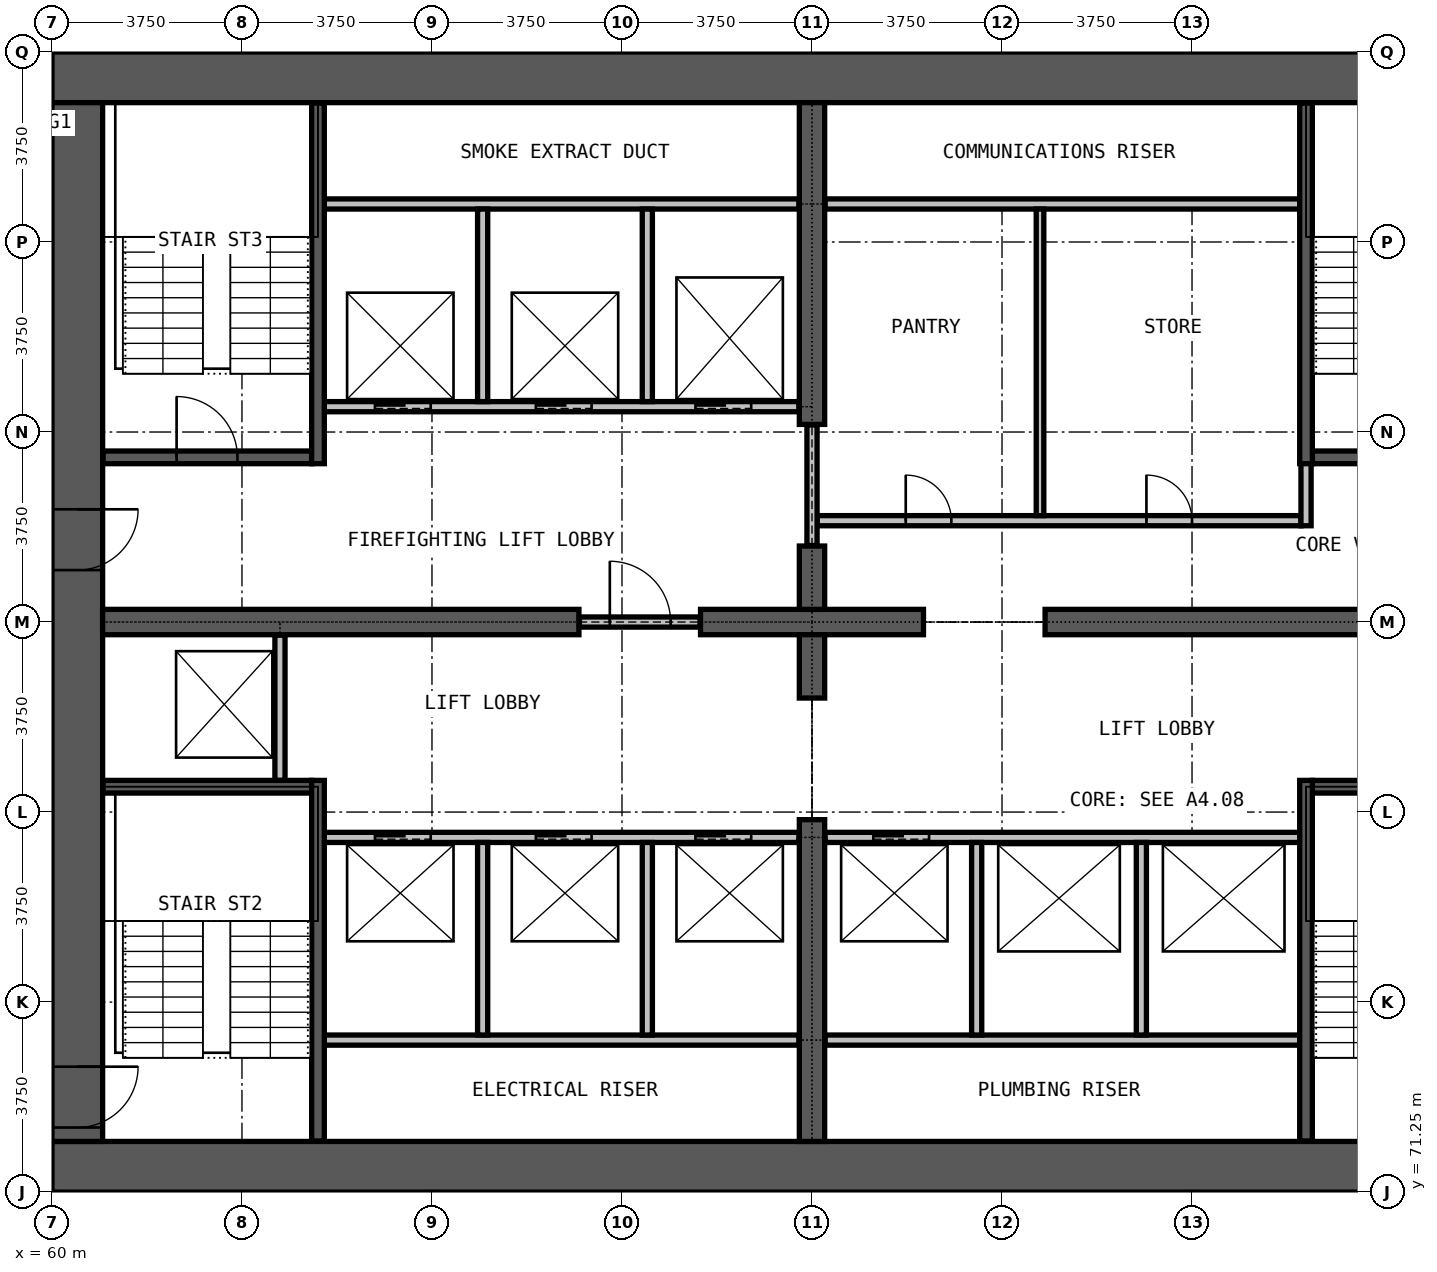
"""IFC4 building model, lengths in metres.
Left out: names, types, materials, properties, quantities, classifications, styles, units other than length and angle.
Written with IfcOpenShell. Run it as: python <this file> out.ifc"""

import sys

from ifc_helpers import new_model, si_unit, direction, frame, frame_2d, origin, place, context, subcontext, project, spatial, rectangle, extrude, element, fill, save


model = new_model("IFC4")
c1 = context("Model", 3, precision=1e-05, world=origin(), true_north=direction((0.0, 1.0)))
c2 = subcontext(c1, "Body", "Model", "MODEL_VIEW")
j1 = project(units=[si_unit("LENGTHUNIT", "METRE"), si_unit("PLANEANGLEUNIT", "RADIAN")], contexts=[c1])
p1 = place(None, origin())
s1 = spatial("IfcSite", under=j1, at=p1, CompositionType="ELEMENT")
p2 = place(p1, origin())
s2 = spatial("IfcBuilding", under=s1, at=p2, CompositionType="ELEMENT")
p3 = place(p2, frame((0.0, 0.0, 92.3)))
s3 = spatial("IfcBuildingStorey", under=s2, at=p3, CompositionType="ELEMENT", Elevation=92.3)
for number, where, z_axis, x_axis in (
    (1, (60.0, 71.75, 0.0), (0.0, 0.0, 1.0), (1.0, 0.0, 0.0)),
    (2, (90.0, 93.25, 0.0), (0.0, 0.0, 1.0), (-1.0, 0.0, 0.0)),
):
    element("IfcWall", number, at=place(p3, frame(where, z_axis=z_axis, x_axis=x_axis)), inside=s3, PredefinedType="SHEAR", context=c2, shape_type="SweptSolid", body=[
        extrude(rectangle(XDim=30.0, YDim=1.0, at=frame_2d((15.0, 0.0))), origin(), (0.0, 0.0, 1.0), 3.3),
    ])
p4 = place(p3, frame((60.5, 92.75, 0.0), z_axis=(0.0, 0.0, 1.0), x_axis=(0.0, -1.0, 0.0)))
e3 = element("IfcWall", 3, at=p4, inside=s3, PredefinedType="SHEAR", context=c2, shape_type="SweptSolid", body=[
    extrude(rectangle(XDim=20.5, YDim=1.0, at=frame_2d((10.25, 0.0))), origin(), (0.0, 0.0, 1.0), 3.3),
])
p5 = place(p4, frame((19.025, 0.0, 0.0)))
e4 = element("IfcOpeningElement", 4, at=p5, cuts=e3, PredefinedType="OPENING", context=c2, shape_type="SweptSolid", body=[
    extrude(rectangle(XDim=1.2, YDim=2.2, at=frame_2d((0.6, 1.1))), frame((0.0, 0.51, 0.0), z_axis=(0.0, -1.0, 0.0), x_axis=(1.0, 0.0, 0.0)), (0.0, 0.0, 1.0), 1.02),
])
p6 = place(p4, frame((8.025, 0.0, 0.0)))
e5 = element("IfcOpeningElement", 5, at=p6, cuts=e3, PredefinedType="OPENING", context=c2, shape_type="SweptSolid", body=[
    extrude(rectangle(XDim=1.2, YDim=2.2, at=frame_2d((0.6, 1.1))), frame((0.0, 0.51, 0.0), z_axis=(0.0, -1.0, 0.0), x_axis=(1.0, 0.0, 0.0)), (0.0, 0.0, 1.0), 1.02),
])
p7 = place(p3, frame((61.0, 82.5, 0.0), z_axis=(0.0, 0.0, 1.0), x_axis=(1.0, 0.0, 0.0)))
e6 = element("IfcWall", 6, at=p7, inside=s3, PredefinedType="SHEAR", context=c2, shape_type="SweptSolid", body=[
    extrude(rectangle(XDim=9.4, YDim=0.5, at=frame_2d((4.7, 0.0))), origin(), (0.0, 0.0, 1.0), 3.3),
])
p8 = place(p3, frame((72.8, 82.5, 0.0), z_axis=(0.0, 0.0, 1.0), x_axis=(1.0, 0.0, 0.0)))
e7 = element("IfcWall", 7, at=p8, inside=s3, PredefinedType="SHEAR", context=c2, shape_type="SweptSolid", body=[
    extrude(rectangle(XDim=4.4, YDim=0.5, at=frame_2d((2.2, 0.0))), origin(), (0.0, 0.0, 1.0), 3.3),
])
p9 = place(p3, frame((79.6, 82.5, 0.0), z_axis=(0.0, 0.0, 1.0), x_axis=(1.0, 0.0, 0.0)))
e8 = element("IfcWall", 8, at=p9, inside=s3, PredefinedType="SHEAR", context=c2, shape_type="SweptSolid", body=[
    extrude(rectangle(XDim=9.4, YDim=0.5, at=frame_2d((4.7, 0.0))), origin(), (0.0, 0.0, 1.0), 3.3),
])
p10 = place(p3, frame((75.0, 72.25, 0.0), z_axis=(0.0, 0.0, 1.0), x_axis=(0.0, 1.0, 0.0)))
e9 = element("IfcWall", 9, at=p10, inside=s3, PredefinedType="SHEAR", context=c2, shape_type="SweptSolid", body=[
    extrude(rectangle(XDim=6.35, YDim=0.5, at=frame_2d((3.175, 0.0))), origin(), (0.0, 0.0, 1.0), 3.3),
])
for number, where, z_axis, x_axis in (
    (10, (75.0, 81.0, 0.0), (0.0, 0.0, 1.0), (0.0, 1.0, 0.0)),
    (11, (75.0, 82.75, 0.0), (0.0, 0.0, 1.0), (0.0, 1.0, 0.0)),
):
    element("IfcWall", number, at=place(p3, frame(where, z_axis=z_axis, x_axis=x_axis)), inside=s3, PredefinedType="SHEAR", context=c2, shape_type="SweptSolid", body=[
        extrude(rectangle(XDim=1.25, YDim=0.5, at=frame_2d((0.625, 0.0))), origin(), (0.0, 0.0, 1.0), 3.3),
    ])
p11 = place(p3, frame((75.0, 86.4, 0.0), z_axis=(0.0, 0.0, 1.0), x_axis=(0.0, 1.0, 0.0)))
e12 = element("IfcWall", 12, at=p11, inside=s3, PredefinedType="SHEAR", context=c2, shape_type="SweptSolid", body=[
    extrude(rectangle(XDim=6.35, YDim=0.5, at=frame_2d((3.175, 0.0))), origin(), (0.0, 0.0, 1.0), 3.3),
])
p12 = place(p3, frame((70.41, 82.5, 0.0), z_axis=(0.0, 0.0, 1.0), x_axis=(1.0, 0.0, 0.0)))
e13 = element("IfcWall", 13, at=p12, inside=s3, PredefinedType="PARTITIONING", context=c2, shape_type="SweptSolid", body=[
    extrude(rectangle(XDim=2.38, YDim=0.2, at=frame_2d((1.19, 0.0))), origin(), (0.0, 0.0, 1.0), 2.4),
])
p13 = place(p12, frame((0.6, 0.0, 0.0)))
e14 = element("IfcOpeningElement", 14, at=p13, cuts=e13, PredefinedType="OPENING", context=c2, shape_type="SweptSolid", body=[
    extrude(rectangle(XDim=1.2, YDim=2.2, at=frame_2d((0.6, 1.1))), frame((0.0, 0.11, 0.0), z_axis=(0.0, -1.0, 0.0), x_axis=(1.0, 0.0, 0.0)), (0.0, 0.0, 1.0), 0.22),
])
p14 = place(p3, frame((75.1, 84.5, 0.0), z_axis=(0.0, 0.0, 1.0), x_axis=(1.0, 0.0, 0.0)))
e15 = element("IfcWall", 15, at=p14, inside=s3, PredefinedType="PARTITIONING", context=c2, shape_type="SweptSolid", body=[
    extrude(rectangle(XDim=9.55, YDim=0.2, at=frame_2d((4.775, 0.0))), origin(), (0.0, 0.0, 1.0), 3.0),
])
p15 = place(p14, frame((1.75, 0.0, 0.0)))
e16 = element("IfcOpeningElement", 16, at=p15, cuts=e15, PredefinedType="OPENING", context=c2, shape_type="SweptSolid", body=[
    extrude(rectangle(XDim=0.9, YDim=2.2, at=frame_2d((0.45, 1.1))), frame((0.0, 0.11, 0.0), z_axis=(0.0, -1.0, 0.0), x_axis=(1.0, 0.0, 0.0)), (0.0, 0.0, 1.0), 0.22),
])
p16 = place(p14, frame((6.5, 0.0, 0.0)))
e17 = element("IfcOpeningElement", 17, at=p16, cuts=e15, PredefinedType="OPENING", context=c2, shape_type="SweptSolid", body=[
    extrude(rectangle(XDim=0.9, YDim=2.2, at=frame_2d((0.45, 1.1))), frame((0.0, 0.11, 0.0), z_axis=(0.0, -1.0, 0.0), x_axis=(1.0, 0.0, 0.0)), (0.0, 0.0, 1.0), 0.22),
])
p17 = place(p3, frame((75.26, 90.75, 0.0), z_axis=(0.0, 0.0, 1.0), x_axis=(1.0, 0.0, 0.0)))
e18 = element("IfcWall", 18, at=p17, inside=s3, PredefinedType="PARTITIONING", context=c2, shape_type="SweptSolid", body=[
    extrude(rectangle(XDim=9.365, YDim=0.2, at=frame_2d((4.683, 0.0))), origin(), (0.0, 0.0, 1.0), 3.0),
])
p18 = place(p3, frame((75.0, 84.01, 0.0), z_axis=(0.0, 0.0, 1.0), x_axis=(0.0, 1.0, 0.0)))
e19 = element("IfcWall", 19, at=p18, inside=s3, PredefinedType="PARTITIONING", context=c2, shape_type="SweptSolid", body=[
    extrude(rectangle(XDim=2.38, YDim=0.2, at=frame_2d((1.19, 0.0))), origin(), (0.0, 0.0, 1.0), 2.4),
])
p19 = place(p3, frame((84.75, 84.4, 0.0), z_axis=(0.0, 0.0, 1.0), x_axis=(0.0, 1.0, 0.0)))
e20 = element("IfcWall", 20, at=p19, inside=s3, PredefinedType="PARTITIONING", context=c2, shape_type="SweptSolid", body=[
    extrude(rectangle(XDim=1.475, YDim=0.2, at=frame_2d((0.738, 0.0))), origin(), (0.0, 0.0, 1.0), 3.0),
])
p20 = place(p3, frame((79.5, 84.6, 0.0), z_axis=(0.0, 0.0, 1.0), x_axis=(0.0, 1.0, 0.0)))
e21 = element("IfcWall", 21, at=p20, inside=s3, PredefinedType="PARTITIONING", context=c2, shape_type="SweptSolid", body=[
    extrude(rectangle(XDim=6.05, YDim=0.15, at=frame_2d((3.025, 0.0))), origin(), (0.0, 0.0, 1.0), 3.0),
])
for number, where, z_axis, x_axis in (
    (22, (65.375, 74.25, 0.0), (0.0, 0.0, 1.0), (1.0, 0.0, 0.0)),
    (23, (75.26, 74.25, 0.0), (0.0, 0.0, 1.0), (1.0, 0.0, 0.0)),
):
    element("IfcWall", number, at=place(p3, frame(where, z_axis=z_axis, x_axis=x_axis)), inside=s3, PredefinedType="PARTITIONING", context=c2, shape_type="SweptSolid", body=[
        extrude(rectangle(XDim=9.365, YDim=0.2, at=frame_2d((4.683, 0.0))), origin(), (0.0, 0.0, 1.0), 3.0),
    ])
p21 = place(p3, frame((65.375, 78.25, 0.0), z_axis=(0.0, 0.0, 1.0), x_axis=(1.0, 0.0, 0.0)))
e24 = element("IfcWall", 24, at=p21, inside=s3, PredefinedType="PARTITIONING", context=c2, shape_type="SweptSolid", body=[
    extrude(rectangle(XDim=9.365, YDim=0.2, at=frame_2d((4.683, 0.0))), origin(), (0.0, 0.0, 1.0), 3.0),
])
p22 = place(p21, frame((1.0, 0.0, 0.0)))
e25 = element("IfcOpeningElement", 25, at=p22, cuts=e24, PredefinedType="OPENING", context=c2, shape_type="SweptSolid", body=[
    extrude(rectangle(XDim=1.1, YDim=2.2, at=frame_2d((0.55, 1.1))), frame((0.0, 0.11, 0.0), z_axis=(0.0, -1.0, 0.0), x_axis=(1.0, 0.0, 0.0)), (0.0, 0.0, 1.0), 0.22),
])
p23 = place(p21, frame((4.175, 0.0, 0.0)))
e26 = element("IfcOpeningElement", 26, at=p23, cuts=e24, PredefinedType="OPENING", context=c2, shape_type="SweptSolid", body=[
    extrude(rectangle(XDim=1.1, YDim=2.2, at=frame_2d((0.55, 1.1))), frame((0.0, 0.11, 0.0), z_axis=(0.0, -1.0, 0.0), x_axis=(1.0, 0.0, 0.0)), (0.0, 0.0, 1.0), 0.22),
])
p24 = place(p21, frame((7.325, 0.0, 0.0)))
e27 = element("IfcOpeningElement", 27, at=p24, cuts=e24, PredefinedType="OPENING", context=c2, shape_type="SweptSolid", body=[
    extrude(rectangle(XDim=1.1, YDim=2.2, at=frame_2d((0.55, 1.1))), frame((0.0, 0.11, 0.0), z_axis=(0.0, -1.0, 0.0), x_axis=(1.0, 0.0, 0.0)), (0.0, 0.0, 1.0), 0.22),
])
p25 = place(p3, frame((75.26, 78.25, 0.0), z_axis=(0.0, 0.0, 1.0), x_axis=(1.0, 0.0, 0.0)))
e28 = element("IfcWall", 28, at=p25, inside=s3, PredefinedType="PARTITIONING", context=c2, shape_type="SweptSolid", body=[
    extrude(rectangle(XDim=9.365, YDim=0.2, at=frame_2d((4.683, 0.0))), origin(), (0.0, 0.0, 1.0), 3.0),
])
p26 = place(p25, frame((0.95, 0.0, 0.0)))
e29 = element("IfcOpeningElement", 29, at=p26, cuts=e28, PredefinedType="OPENING", context=c2, shape_type="SweptSolid", body=[
    extrude(rectangle(XDim=1.1, YDim=2.2, at=frame_2d((0.55, 1.1))), frame((0.0, 0.11, 0.0), z_axis=(0.0, -1.0, 0.0), x_axis=(1.0, 0.0, 0.0)), (0.0, 0.0, 1.0), 0.22),
])
p27 = place(p3, frame((65.375, 86.75, 0.0), z_axis=(0.0, 0.0, 1.0), x_axis=(1.0, 0.0, 0.0)))
e30 = element("IfcWall", 30, at=p27, inside=s3, PredefinedType="PARTITIONING", context=c2, shape_type="SweptSolid", body=[
    extrude(rectangle(XDim=9.365, YDim=0.2, at=frame_2d((4.683, 0.0))), origin(), (0.0, 0.0, 1.0), 3.0),
])
p28 = place(p27, frame((1.0, 0.0, 0.0)))
e31 = element("IfcOpeningElement", 31, at=p28, cuts=e30, PredefinedType="OPENING", context=c2, shape_type="SweptSolid", body=[
    extrude(rectangle(XDim=1.1, YDim=2.2, at=frame_2d((0.55, 1.1))), frame((0.0, 0.11, 0.0), z_axis=(0.0, -1.0, 0.0), x_axis=(1.0, 0.0, 0.0)), (0.0, 0.0, 1.0), 0.22),
])
p29 = place(p27, frame((4.175, 0.0, 0.0)))
e32 = element("IfcOpeningElement", 32, at=p29, cuts=e30, PredefinedType="OPENING", context=c2, shape_type="SweptSolid", body=[
    extrude(rectangle(XDim=1.1, YDim=2.2, at=frame_2d((0.55, 1.1))), frame((0.0, 0.11, 0.0), z_axis=(0.0, -1.0, 0.0), x_axis=(1.0, 0.0, 0.0)), (0.0, 0.0, 1.0), 0.22),
])
p30 = place(p27, frame((7.325, 0.0, 0.0)))
e33 = element("IfcOpeningElement", 33, at=p30, cuts=e30, PredefinedType="OPENING", context=c2, shape_type="SweptSolid", body=[
    extrude(rectangle(XDim=1.1, YDim=2.2, at=frame_2d((0.55, 1.1))), frame((0.0, 0.11, 0.0), z_axis=(0.0, -1.0, 0.0), x_axis=(1.0, 0.0, 0.0)), (0.0, 0.0, 1.0), 0.22),
])
p31 = place(p3, frame((65.375, 90.75, 0.0), z_axis=(0.0, 0.0, 1.0), x_axis=(1.0, 0.0, 0.0)))
e34 = element("IfcWall", 34, at=p31, inside=s3, PredefinedType="PARTITIONING", context=c2, shape_type="SweptSolid", body=[
    extrude(rectangle(XDim=9.365, YDim=0.2, at=frame_2d((4.683, 0.0))), origin(), (0.0, 0.0, 1.0), 3.0),
])
p32 = place(p3, frame((64.5, 79.375, 0.0), z_axis=(0.0, 0.0, 1.0), x_axis=(0.0, 1.0, 0.0)))
e35 = element("IfcWall", 35, at=p32, inside=s3, PredefinedType="PARTITIONING", context=c2, shape_type="SweptSolid", body=[
    extrude(rectangle(XDim=2.865, YDim=0.2, at=frame_2d((1.433, 0.0))), origin(), (0.0, 0.0, 1.0), 3.0),
])
for number, where, z_axis, x_axis in (
    (36, (68.5, 74.35, 0.0), (0.0, 0.0, 1.0), (0.0, 1.0, 0.0)),
    (37, (68.5, 86.85, 0.0), (0.0, 0.0, 1.0), (0.0, 1.0, 0.0)),
    (38, (71.75, 74.35, 0.0), (0.0, 0.0, 1.0), (0.0, 1.0, 0.0)),
    (39, (71.75, 86.85, 0.0), (0.0, 0.0, 1.0), (0.0, 1.0, 0.0)),
    (40, (78.25, 74.35, 0.0), (0.0, 0.0, 1.0), (0.0, 1.0, 0.0)),
    (41, (81.5, 74.35, 0.0), (0.0, 0.0, 1.0), (0.0, 1.0, 0.0)),
):
    element("IfcWall", number, at=place(p3, frame(where, z_axis=z_axis, x_axis=x_axis)), inside=s3, PredefinedType="PARTITIONING", context=c2, shape_type="SweptSolid", body=[
        extrude(rectangle(XDim=3.8, YDim=0.2, at=frame_2d((1.9, 0.0))), origin(), (0.0, 0.0, 1.0), 3.0),
    ])
for number, where, z_axis, x_axis in (
    (42, (61.01, 79.25, 0.0), (0.0, 0.0, 1.0), (1.0, 0.0, 0.0)),
    (43, (84.875, 79.25, 0.0), (0.0, 0.0, 1.0), (1.0, 0.0, 0.0)),
):
    element("IfcWall", number, at=place(p3, frame(where, z_axis=z_axis, x_axis=x_axis)), inside=s3, PredefinedType="PARTITIONING", context=c2, shape_type="SweptSolid", body=[
        extrude(rectangle(XDim=4.115, YDim=0.25, at=frame_2d((2.058, 0.0))), origin(), (0.0, 0.0, 1.0), 3.0),
    ])
p33 = place(p3, frame((61.01, 85.75, 0.0), z_axis=(0.0, 0.0, 1.0), x_axis=(1.0, 0.0, 0.0)))
e44 = element("IfcWall", 44, at=p33, inside=s3, PredefinedType="PARTITIONING", context=c2, shape_type="SweptSolid", body=[
    extrude(rectangle(XDim=4.115, YDim=0.25, at=frame_2d((2.058, 0.0))), origin(), (0.0, 0.0, 1.0), 3.0),
])
p34 = place(p33, frame((1.45, 0.0, 0.0)))
e45 = element("IfcOpeningElement", 45, at=p34, cuts=e44, PredefinedType="OPENING", context=c2, shape_type="SweptSolid", body=[
    extrude(rectangle(XDim=1.2, YDim=2.2, at=frame_2d((0.6, 1.1))), frame((0.0, 0.135, 0.0), z_axis=(0.0, -1.0, 0.0), x_axis=(1.0, 0.0, 0.0)), (0.0, 0.0, 1.0), 0.27),
])
p35 = place(p3, frame((84.875, 85.75, 0.0), z_axis=(0.0, 0.0, 1.0), x_axis=(1.0, 0.0, 0.0)))
e46 = element("IfcWall", 46, at=p35, inside=s3, PredefinedType="PARTITIONING", context=c2, shape_type="SweptSolid", body=[
    extrude(rectangle(XDim=4.115, YDim=0.25, at=frame_2d((2.058, 0.0))), origin(), (0.0, 0.0, 1.0), 3.0),
])
for number, where, z_axis, x_axis in (
    (47, (65.25, 72.26, 0.0), (0.0, 0.0, 1.0), (0.0, 1.0, 0.0)),
    (48, (65.25, 85.625, 0.0), (0.0, 0.0, 1.0), (0.0, 1.0, 0.0)),
    (49, (84.75, 72.26, 0.0), (0.0, 0.0, 1.0), (0.0, 1.0, 0.0)),
    (50, (84.75, 85.625, 0.0), (0.0, 0.0, 1.0), (0.0, 1.0, 0.0)),
):
    element("IfcWall", number, at=place(p3, frame(where, z_axis=z_axis, x_axis=x_axis)), inside=s3, PredefinedType="PARTITIONING", context=c2, shape_type="SweptSolid", body=[
        extrude(rectangle(XDim=7.115, YDim=0.25, at=frame_2d((3.558, 0.0))), origin(), (0.0, 0.0, 1.0), 3.0),
    ])
p36 = place(p22, origin())
e51 = element("IfcDoor", 51, at=p36, inside=s3, OperationType="DOUBLE_DOOR_SLIDING", PredefinedType="DOOR", context=c2, shape_type="SweptSolid", body=[
    extrude(rectangle(XDim=1.1, YDim=2.2, at=frame_2d((0.55, 1.1))), frame((0.0, 0.025, 0.0), z_axis=(0.0, -1.0, 0.0), x_axis=(1.0, 0.0, 0.0)), (0.0, 0.0, 1.0), 0.05),
])
fill(e25, e51)
p37 = place(p23, origin())
e52 = element("IfcDoor", 52, at=p37, inside=s3, OperationType="DOUBLE_DOOR_SLIDING", PredefinedType="DOOR", context=c2, shape_type="SweptSolid", body=[
    extrude(rectangle(XDim=1.1, YDim=2.2, at=frame_2d((0.55, 1.1))), frame((0.0, 0.025, 0.0), z_axis=(0.0, -1.0, 0.0), x_axis=(1.0, 0.0, 0.0)), (0.0, 0.0, 1.0), 0.05),
])
fill(e26, e52)
p38 = place(p24, origin())
e53 = element("IfcDoor", 53, at=p38, inside=s3, OperationType="DOUBLE_DOOR_SLIDING", PredefinedType="DOOR", context=c2, shape_type="SweptSolid", body=[
    extrude(rectangle(XDim=1.1, YDim=2.2, at=frame_2d((0.55, 1.1))), frame((0.0, 0.025, 0.0), z_axis=(0.0, -1.0, 0.0), x_axis=(1.0, 0.0, 0.0)), (0.0, 0.0, 1.0), 0.05),
])
fill(e27, e53)
p39 = place(p26, origin())
e54 = element("IfcDoor", 54, at=p39, inside=s3, OperationType="DOUBLE_DOOR_SLIDING", PredefinedType="DOOR", context=c2, shape_type="SweptSolid", body=[
    extrude(rectangle(XDim=1.1, YDim=2.2, at=frame_2d((0.55, 1.1))), frame((0.0, 0.025, 0.0), z_axis=(0.0, -1.0, 0.0), x_axis=(1.0, 0.0, 0.0)), (0.0, 0.0, 1.0), 0.05),
])
fill(e29, e54)
p40 = place(p28, origin())
e55 = element("IfcDoor", 55, at=p40, inside=s3, OperationType="DOUBLE_DOOR_SLIDING", PredefinedType="DOOR", context=c2, shape_type="SweptSolid", body=[
    extrude(rectangle(XDim=1.1, YDim=2.2, at=frame_2d((0.55, 1.1))), frame((0.0, 0.025, 0.0), z_axis=(0.0, -1.0, 0.0), x_axis=(1.0, 0.0, 0.0)), (0.0, 0.0, 1.0), 0.05),
])
fill(e31, e55)
p41 = place(p29, origin())
e56 = element("IfcDoor", 56, at=p41, inside=s3, OperationType="DOUBLE_DOOR_SLIDING", PredefinedType="DOOR", context=c2, shape_type="SweptSolid", body=[
    extrude(rectangle(XDim=1.1, YDim=2.2, at=frame_2d((0.55, 1.1))), frame((0.0, 0.025, 0.0), z_axis=(0.0, -1.0, 0.0), x_axis=(1.0, 0.0, 0.0)), (0.0, 0.0, 1.0), 0.05),
])
fill(e32, e56)
p42 = place(p30, origin())
e57 = element("IfcDoor", 57, at=p42, inside=s3, OperationType="DOUBLE_DOOR_SLIDING", PredefinedType="DOOR", context=c2, shape_type="SweptSolid", body=[
    extrude(rectangle(XDim=1.1, YDim=2.2, at=frame_2d((0.55, 1.1))), frame((0.0, 0.025, 0.0), z_axis=(0.0, -1.0, 0.0), x_axis=(1.0, 0.0, 0.0)), (0.0, 0.0, 1.0), 0.05),
])
fill(e33, e57)
p43 = place(p13, origin())
e58 = element("IfcDoor", 58, at=p43, inside=s3, OperationType="SINGLE_SWING_RIGHT", PredefinedType="DOOR", context=c2, shape_type="SweptSolid", body=[
    extrude(rectangle(XDim=1.2, YDim=2.2, at=frame_2d((0.6, 1.1))), frame((0.0, 0.025, 0.0), z_axis=(0.0, -1.0, 0.0), x_axis=(1.0, 0.0, 0.0)), (0.0, 0.0, 1.0), 0.05),
])
fill(e14, e58)
p44 = place(p34, origin())
e59 = element("IfcDoor", 59, at=p44, inside=s3, OperationType="SINGLE_SWING_RIGHT", PredefinedType="DOOR", context=c2, shape_type="SweptSolid", body=[
    extrude(rectangle(XDim=1.2, YDim=2.2, at=frame_2d((0.6, 1.1))), frame((0.0, 0.025, 0.0), z_axis=(0.0, -1.0, 0.0), x_axis=(1.0, 0.0, 0.0)), (0.0, 0.0, 1.0), 0.05),
])
fill(e45, e59)
p45 = place(p5, origin())
e60 = element("IfcDoor", 60, at=p45, inside=s3, OperationType="SINGLE_SWING_LEFT", PredefinedType="DOOR", context=c2, shape_type="SweptSolid", body=[
    extrude(rectangle(XDim=1.2, YDim=2.2, at=frame_2d((0.6, 1.1))), frame((0.0, 0.025, 0.0), z_axis=(0.0, -1.0, 0.0), x_axis=(1.0, 0.0, 0.0)), (0.0, 0.0, 1.0), 0.05),
])
fill(e4, e60)
p46 = place(p6, origin())
e61 = element("IfcDoor", 61, at=p46, inside=s3, OperationType="SINGLE_SWING_RIGHT", PredefinedType="DOOR", context=c2, shape_type="SweptSolid", body=[
    extrude(rectangle(XDim=1.2, YDim=2.2, at=frame_2d((0.6, 1.1))), frame((0.0, 0.025, 0.0), z_axis=(0.0, -1.0, 0.0), x_axis=(1.0, 0.0, 0.0)), (0.0, 0.0, 1.0), 0.05),
])
fill(e5, e61)
p47 = place(p15, origin())
e62 = element("IfcDoor", 62, at=p47, inside=s3, OperationType="SINGLE_SWING_LEFT", PredefinedType="DOOR", context=c2, shape_type="SweptSolid", body=[
    extrude(rectangle(XDim=0.9, YDim=2.2, at=frame_2d((0.45, 1.1))), frame((0.0, 0.025, 0.0), z_axis=(0.0, -1.0, 0.0), x_axis=(1.0, 0.0, 0.0)), (0.0, 0.0, 1.0), 0.05),
])
fill(e16, e62)
p48 = place(p16, origin())
e63 = element("IfcDoor", 63, at=p48, inside=s3, OperationType="SINGLE_SWING_LEFT", PredefinedType="DOOR", context=c2, shape_type="SweptSolid", body=[
    extrude(rectangle(XDim=0.9, YDim=2.2, at=frame_2d((0.45, 1.1))), frame((0.0, 0.025, 0.0), z_axis=(0.0, -1.0, 0.0), x_axis=(1.0, 0.0, 0.0)), (0.0, 0.0, 1.0), 0.05),
])
fill(e17, e63)
save(model, sys.argv[1])
